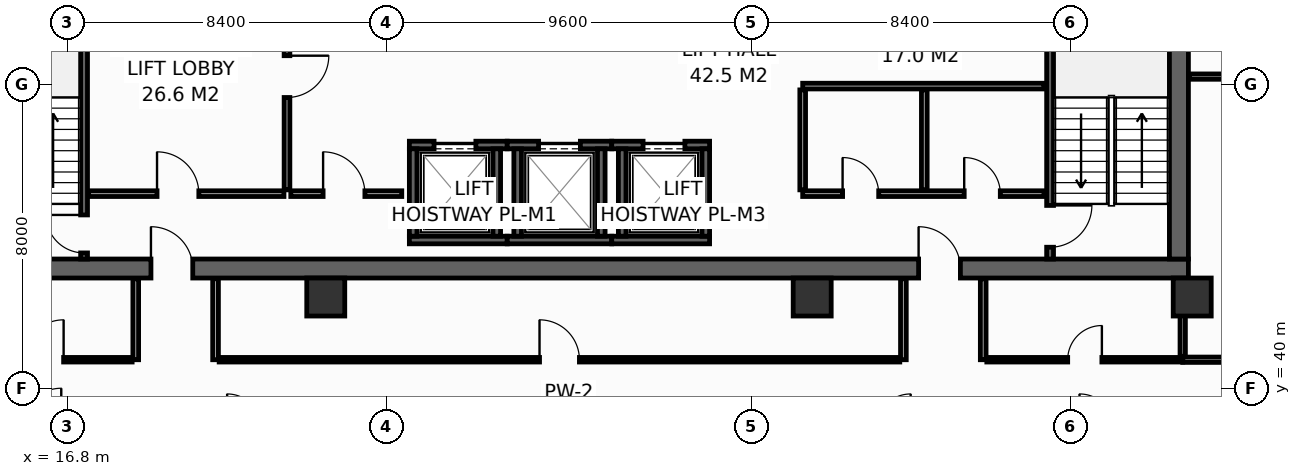
"""IFC4 building model, lengths in metres.
Left out: names, types, materials, properties, quantities, classifications, styles, units other than length and angle.
Written with IfcOpenShell. Run it as: python <this file> out.ifc"""

import sys

from ifc_helpers import new_model, si_unit, direction, frame, frame_2d, origin, origin_2d, place, context, subcontext, project, spatial, rectangle, hollow_rectangle, extrude, element, fill, save


model = new_model("IFC4")
c1 = context("Model", 3, precision=1e-05, world=origin(), true_north=direction((0.0, 1.0)))
c2 = subcontext(c1, "Body", "Model", "MODEL_VIEW")
j1 = project(units=[si_unit("LENGTHUNIT", "METRE"), si_unit("PLANEANGLEUNIT", "RADIAN")], contexts=[c1])
p1 = place(None, origin())
s1 = spatial("IfcSite", under=j1, at=p1, CompositionType="ELEMENT")
p2 = place(p1, origin())
s2 = spatial("IfcBuilding", under=s1, at=p2, CompositionType="ELEMENT")
p3 = place(p2, frame((0.0, 0.0, 133.4)))
s3 = spatial("IfcBuildingStorey", under=s2, at=p3, CompositionType="ELEMENT", Elevation=133.4)
p4 = place(p3, frame((13.6, 43.15, 0.0), z_axis=(0.0, 0.0, 1.0), x_axis=(1.0, 0.0, 0.0)))
e1 = element("IfcWall", 1, at=p4, inside=s3, PredefinedType="SHEAR", context=c2, shape_type="SweptSolid", body=[
    extrude(rectangle(XDim=32.7, YDim=0.5, at=frame_2d((16.35, 0.0))), origin(), (0.0, 0.0, 1.0), 3.55),
])
p5 = place(p4, frame((5.4, 0.0, 0.0)))
e2 = element("IfcOpeningElement", 2, at=p5, cuts=e1, PredefinedType="OPENING", context=c2, shape_type="SweptSolid", body=[
    extrude(rectangle(XDim=1.1, YDim=2.15, at=frame_2d((0.55, 1.075))), frame((0.0, 0.26, 0.0), z_axis=(0.0, -1.0, 0.0), x_axis=(1.0, 0.0, 0.0)), (0.0, 0.0, 1.0), 0.52),
])
p6 = place(p4, frame((25.6, 0.0, 0.0)))
e3 = element("IfcOpeningElement", 3, at=p6, cuts=e1, PredefinedType="OPENING", context=c2, shape_type="SweptSolid", body=[
    extrude(rectangle(XDim=1.1, YDim=2.15, at=frame_2d((0.55, 1.075))), frame((0.0, 0.26, 0.0), z_axis=(0.0, -1.0, 0.0), x_axis=(1.0, 0.0, 0.0)), (0.0, 0.0, 1.0), 0.52),
])
p7 = place(p3, frame((46.05, 43.4, 0.0), z_axis=(0.0, 0.0, 1.0), x_axis=(0.0, 1.0, 0.0)))
e4 = element("IfcWall", 4, at=p7, inside=s3, PredefinedType="SHEAR", context=c2, shape_type="SweptSolid", body=[
    extrude(rectangle(XDim=10.4, YDim=0.5, at=frame_2d((5.2, 0.0))), origin(), (0.0, 0.0, 1.0), 3.55),
])
for number, where, z_axis, x_axis in (
    (5, (23.6, 42.4, 0.0), (0.0, 0.0, 1.0), (1.0, 0.0, 0.0)),
    (6, (36.4, 42.4, 0.0), (0.0, 0.0, 1.0), (1.0, 0.0, 0.0)),
    (7, (46.4, 42.4, 0.0), (0.0, 0.0, 1.0), (1.0, 0.0, 0.0)),
):
    element("IfcColumn", number, at=place(p3, frame(where, z_axis=z_axis, x_axis=x_axis)), inside=s3, PredefinedType="COLUMN", context=c2, shape_type="SweptSolid", body=[
        extrude(hollow_rectangle(XDim=1.0, YDim=1.0, WallThickness=0.045, at=origin_2d()), origin(), (0.0, 0.0, 1.0), 3.8),
    ])
p8 = place(p3, frame((25.8, 43.9, 0.0), z_axis=(0.0, 0.0, 1.0), x_axis=(1.0, 0.0, 0.0)))
e8 = element("IfcWall", 8, at=p8, inside=s3, PredefinedType="SHEAR", context=c2, shape_type="SweptSolid", body=[
    extrude(rectangle(XDim=2.575, YDim=0.2, at=frame_2d((1.288, 0.0))), origin(), (0.0, 0.0, 1.0), 3.55),
])
p9 = place(p3, frame((25.8, 46.4, 0.0), z_axis=(0.0, 0.0, 1.0), x_axis=(1.0, 0.0, 0.0)))
e9 = element("IfcWall", 9, at=p9, inside=s3, PredefinedType="SHEAR", context=c2, shape_type="SweptSolid", body=[
    extrude(rectangle(XDim=2.575, YDim=0.2, at=frame_2d((1.288, 0.0))), origin(), (0.0, 0.0, 1.0), 3.55),
])
p10 = place(p9, frame((0.65, 0.0, 0.0)))
e10 = element("IfcOpeningElement", 10, at=p10, cuts=e9, PredefinedType="OPENING", context=c2, shape_type="SweptSolid", body=[
    extrude(rectangle(XDim=1.1, YDim=2.2, at=frame_2d((0.55, 1.1))), frame((0.0, 0.11, 0.0), z_axis=(0.0, -1.0, 0.0), x_axis=(1.0, 0.0, 0.0)), (0.0, 0.0, 1.0), 0.22),
])
for number, where, z_axis, x_axis in (
    (11, (25.9, 44.0, 0.0), (0.0, 0.0, 1.0), (0.0, 1.0, 0.0)),
    (12, (28.1, 44.0, 0.0), (0.0, 0.0, 1.0), (0.0, 1.0, 0.0)),
):
    element("IfcWall", number, at=place(p3, frame(where, z_axis=z_axis, x_axis=x_axis)), inside=s3, PredefinedType="SHEAR", context=c2, shape_type="SweptSolid", body=[
        extrude(rectangle(XDim=2.3, YDim=0.2, at=frame_2d((1.15, 0.0))), origin(), (0.0, 0.0, 1.0), 3.55),
    ])
p11 = place(p3, frame((28.375, 43.9, 0.0), z_axis=(0.0, 0.0, 1.0), x_axis=(1.0, 0.0, 0.0)))
e13 = element("IfcWall", 13, at=p11, inside=s3, PredefinedType="SHEAR", context=c2, shape_type="SweptSolid", body=[
    extrude(rectangle(XDim=2.75, YDim=0.2, at=frame_2d((1.375, 0.0))), origin(), (0.0, 0.0, 1.0), 3.55),
])
p12 = place(p3, frame((28.375, 46.4, 0.0), z_axis=(0.0, 0.0, 1.0), x_axis=(1.0, 0.0, 0.0)))
e14 = element("IfcWall", 14, at=p12, inside=s3, PredefinedType="SHEAR", context=c2, shape_type="SweptSolid", body=[
    extrude(rectangle(XDim=2.75, YDim=0.2, at=frame_2d((1.375, 0.0))), origin(), (0.0, 0.0, 1.0), 3.55),
])
p13 = place(p12, frame((0.825, 0.0, 0.0)))
e15 = element("IfcOpeningElement", 15, at=p13, cuts=e14, PredefinedType="OPENING", context=c2, shape_type="SweptSolid", body=[
    extrude(rectangle(XDim=1.1, YDim=2.2, at=frame_2d((0.55, 1.1))), frame((0.0, 0.11, 0.0), z_axis=(0.0, -1.0, 0.0), x_axis=(1.0, 0.0, 0.0)), (0.0, 0.0, 1.0), 0.22),
])
for number, where, z_axis, x_axis in (
    (16, (28.65, 44.0, 0.0), (0.0, 0.0, 1.0), (0.0, 1.0, 0.0)),
    (17, (30.85, 44.0, 0.0), (0.0, 0.0, 1.0), (0.0, 1.0, 0.0)),
):
    element("IfcWall", number, at=place(p3, frame(where, z_axis=z_axis, x_axis=x_axis)), inside=s3, PredefinedType="SHEAR", context=c2, shape_type="SweptSolid", body=[
        extrude(rectangle(XDim=2.3, YDim=0.2, at=frame_2d((1.15, 0.0))), origin(), (0.0, 0.0, 1.0), 3.55),
    ])
p14 = place(p3, frame((31.125, 43.9, 0.0), z_axis=(0.0, 0.0, 1.0), x_axis=(1.0, 0.0, 0.0)))
e18 = element("IfcWall", 18, at=p14, inside=s3, PredefinedType="SHEAR", context=c2, shape_type="SweptSolid", body=[
    extrude(rectangle(XDim=2.575, YDim=0.2, at=frame_2d((1.288, 0.0))), origin(), (0.0, 0.0, 1.0), 3.55),
])
p15 = place(p3, frame((31.125, 46.4, 0.0), z_axis=(0.0, 0.0, 1.0), x_axis=(1.0, 0.0, 0.0)))
e19 = element("IfcWall", 19, at=p15, inside=s3, PredefinedType="SHEAR", context=c2, shape_type="SweptSolid", body=[
    extrude(rectangle(XDim=2.575, YDim=0.2, at=frame_2d((1.288, 0.0))), origin(), (0.0, 0.0, 1.0), 3.55),
])
p16 = place(p15, frame((0.825, 0.0, 0.0)))
e20 = element("IfcOpeningElement", 20, at=p16, cuts=e19, PredefinedType="OPENING", context=c2, shape_type="SweptSolid", body=[
    extrude(rectangle(XDim=1.1, YDim=2.2, at=frame_2d((0.55, 1.1))), frame((0.0, 0.11, 0.0), z_axis=(0.0, -1.0, 0.0), x_axis=(1.0, 0.0, 0.0)), (0.0, 0.0, 1.0), 0.22),
])
for number, where, z_axis, x_axis in (
    (21, (31.4, 44.0, 0.0), (0.0, 0.0, 1.0), (0.0, 1.0, 0.0)),
    (22, (33.6, 44.0, 0.0), (0.0, 0.0, 1.0), (0.0, 1.0, 0.0)),
):
    element("IfcWall", number, at=place(p3, frame(where, z_axis=z_axis, x_axis=x_axis)), inside=s3, PredefinedType="SHEAR", context=c2, shape_type="SweptSolid", body=[
        extrude(rectangle(XDim=2.3, YDim=0.2, at=frame_2d((1.15, 0.0))), origin(), (0.0, 0.0, 1.0), 3.55),
    ])
p17 = place(p3, frame((17.24, 43.4, 0.0), z_axis=(0.0, 0.0, 1.0), x_axis=(0.0, 1.0, 0.0)))
e23 = element("IfcWall", 23, at=p17, inside=s3, PredefinedType="SHEAR", context=c2, shape_type="SweptSolid", body=[
    extrude(rectangle(XDim=10.4, YDim=0.18, at=frame_2d((5.2, 0.0))), origin(), (0.0, 0.0, 1.0), 3.55),
])
p18 = place(p17, frame((0.16, 0.0, 0.0)))
e24 = element("IfcOpeningElement", 24, at=p18, cuts=e23, PredefinedType="OPENING", context=c2, shape_type="SweptSolid", body=[
    extrude(rectangle(XDim=1.0, YDim=2.15, at=frame_2d((0.5, 1.075))), frame((0.0, 0.1, 0.0), z_axis=(0.0, -1.0, 0.0), x_axis=(1.0, 0.0, 0.0)), (0.0, 0.0, 1.0), 0.2),
])
p19 = place(p3, frame((42.66, 53.8, 0.0), z_axis=(0.0, 0.0, 1.0), x_axis=(0.0, -1.0, 0.0)))
e25 = element("IfcWall", 25, at=p19, inside=s3, PredefinedType="SHEAR", context=c2, shape_type="SweptSolid", body=[
    extrude(rectangle(XDim=10.4, YDim=0.18, at=frame_2d((5.2, 0.0))), origin(), (0.0, 0.0, 1.0), 3.55),
])
p20 = place(p19, frame((8.99, 0.0, 0.0)))
e26 = element("IfcOpeningElement", 26, at=p20, cuts=e25, PredefinedType="OPENING", context=c2, shape_type="SweptSolid", body=[
    extrude(rectangle(XDim=1.1, YDim=2.15, at=frame_2d((0.55, 1.075))), frame((0.0, 0.1, 0.0), z_axis=(0.0, -1.0, 0.0), x_axis=(1.0, 0.0, 0.0)), (0.0, 0.0, 1.0), 0.2),
])
p21 = place(p3, frame((17.36, 45.12, 0.0), z_axis=(0.0, 0.0, 1.0), x_axis=(1.0, 0.0, 0.0)))
e27 = element("IfcWall", 27, at=p21, inside=s3, PredefinedType="PARTITIONING", context=c2, shape_type="SweptSolid", body=[
    extrude(rectangle(XDim=5.14, YDim=0.15, at=frame_2d((2.57, 0.0))), origin(), (0.0, 0.0, 1.0), 3.55),
])
p22 = place(p21, frame((1.8, 0.0, 0.0)))
e28 = element("IfcOpeningElement", 28, at=p22, cuts=e27, PredefinedType="OPENING", context=c2, shape_type="SweptSolid", body=[
    extrude(rectangle(XDim=1.1, YDim=2.15, at=frame_2d((0.55, 1.075))), frame((0.0, 0.085, 0.0), z_axis=(0.0, -1.0, 0.0), x_axis=(1.0, 0.0, 0.0)), (0.0, 0.0, 1.0), 0.17),
])
p23 = place(p3, frame((22.58, 50.55, 0.0), z_axis=(0.0, 0.0, 1.0), x_axis=(0.0, -1.0, 0.0)))
e29 = element("IfcWall", 29, at=p23, inside=s3, PredefinedType="PARTITIONING", context=c2, shape_type="SweptSolid", body=[
    extrude(rectangle(XDim=5.33, YDim=0.15, at=frame_2d((2.665, 0.0))), origin(), (0.0, 0.0, 1.0), 3.55),
])
p24 = place(p23, frame((1.8, 0.0, 0.0)))
e30 = element("IfcOpeningElement", 30, at=p24, cuts=e29, PredefinedType="OPENING", context=c2, shape_type="SweptSolid", body=[
    extrude(rectangle(XDim=1.1, YDim=2.15, at=frame_2d((0.55, 1.075))), frame((0.0, 0.085, 0.0), z_axis=(0.0, -1.0, 0.0), x_axis=(1.0, 0.0, 0.0)), (0.0, 0.0, 1.0), 0.17),
])
p25 = place(p3, frame((22.68, 45.12, 0.0), z_axis=(0.0, 0.0, 1.0), x_axis=(1.0, 0.0, 0.0)))
e31 = element("IfcWall", 31, at=p25, inside=s3, PredefinedType="PARTITIONING", context=c2, shape_type="SweptSolid", body=[
    extrude(rectangle(XDim=2.92, YDim=0.15, at=frame_2d((1.46, 0.0))), origin(), (0.0, 0.0, 1.0), 3.55),
])
p26 = place(p25, frame((0.85, 0.0, 0.0)))
e32 = element("IfcOpeningElement", 32, at=p26, cuts=e31, PredefinedType="OPENING", context=c2, shape_type="SweptSolid", body=[
    extrude(rectangle(XDim=1.1, YDim=2.15, at=frame_2d((0.55, 1.075))), frame((0.0, 0.085, 0.0), z_axis=(0.0, -1.0, 0.0), x_axis=(1.0, 0.0, 0.0)), (0.0, 0.0, 1.0), 0.17),
])
p27 = place(p3, frame((36.15, 45.12, 0.0), z_axis=(0.0, 0.0, 1.0), x_axis=(1.0, 0.0, 0.0)))
e33 = element("IfcWall", 33, at=p27, inside=s3, PredefinedType="PARTITIONING", context=c2, shape_type="SweptSolid", body=[
    extrude(rectangle(XDim=6.35, YDim=0.15, at=frame_2d((3.175, 0.0))), origin(), (0.0, 0.0, 1.0), 3.55),
])
p28 = place(p27, frame((1.05, 0.0, 0.0)))
e34 = element("IfcOpeningElement", 34, at=p28, cuts=e33, PredefinedType="OPENING", context=c2, shape_type="SweptSolid", body=[
    extrude(rectangle(XDim=0.95, YDim=2.15, at=frame_2d((0.475, 1.075))), frame((0.0, 0.085, 0.0), z_axis=(0.0, -1.0, 0.0), x_axis=(1.0, 0.0, 0.0)), (0.0, 0.0, 1.0), 0.17),
])
p29 = place(p27, frame((4.25, 0.0, 0.0)))
e35 = element("IfcOpeningElement", 35, at=p29, cuts=e33, PredefinedType="OPENING", context=c2, shape_type="SweptSolid", body=[
    extrude(rectangle(XDim=0.95, YDim=2.15, at=frame_2d((0.475, 1.075))), frame((0.0, 0.085, 0.0), z_axis=(0.0, -1.0, 0.0), x_axis=(1.0, 0.0, 0.0)), (0.0, 0.0, 1.0), 0.17),
])
p30 = place(p3, frame((36.15, 47.95, 0.0), z_axis=(0.0, 0.0, 1.0), x_axis=(1.0, 0.0, 0.0)))
e36 = element("IfcWall", 36, at=p30, inside=s3, PredefinedType="PARTITIONING", context=c2, shape_type="SweptSolid", body=[
    extrude(rectangle(XDim=6.35, YDim=0.15, at=frame_2d((3.175, 0.0))), origin(), (0.0, 0.0, 1.0), 3.55),
])
for number, where, z_axis, x_axis in (
    (37, (36.15, 45.22, 0.0), (0.0, 0.0, 1.0), (0.0, 1.0, 0.0)),
    (38, (39.35, 45.22, 0.0), (0.0, 0.0, 1.0), (0.0, 1.0, 0.0)),
):
    element("IfcWall", number, at=place(p3, frame(where, z_axis=z_axis, x_axis=x_axis)), inside=s3, PredefinedType="PARTITIONING", context=c2, shape_type="SweptSolid", body=[
        extrude(rectangle(XDim=2.63, YDim=0.15, at=frame_2d((1.315, 0.0))), origin(), (0.0, 0.0, 1.0), 3.55),
    ])
p31 = place(p3, frame((46.15, 40.75, 0.0), z_axis=(0.0, 0.0, 1.0), x_axis=(1.0, 0.0, 0.0)))
e39 = element("IfcWall", 39, at=p31, inside=s3, PredefinedType="PARTITIONING", context=c2, shape_type="SweptSolid", body=[
    extrude(rectangle(XDim=4.05, YDim=0.14, at=frame_2d((2.025, 0.0))), origin(), (0.0, 0.0, 1.0), 3.55),
])
p32 = place(p3, frame((46.15, 40.84, 0.0), z_axis=(0.0, 0.0, 1.0), x_axis=(0.0, 1.0, 0.0)))
e40 = element("IfcWall", 40, at=p32, inside=s3, PredefinedType="PARTITIONING", context=c2, shape_type="SweptSolid", body=[
    extrude(rectangle(XDim=2.04, YDim=0.14, at=frame_2d((1.02, 0.0))), origin(), (0.0, 0.0, 1.0), 3.55),
])
p33 = place(p3, frame((46.32, 48.2, 0.0), z_axis=(0.0, 0.0, 1.0), x_axis=(1.0, 0.0, 0.0)))
e41 = element("IfcWall", 41, at=p33, inside=s3, PredefinedType="PARTITIONING", context=c2, shape_type="SweptSolid", body=[
    extrude(rectangle(XDim=3.88, YDim=0.14, at=frame_2d((1.94, 0.0))), origin(), (0.0, 0.0, 1.0), 3.55),
])
for number, where, z_axis, x_axis in (
    (42, (18.6, 40.75, 0.0), (0.0, 0.0, 1.0), (0.0, 1.0, 0.0)),
    (43, (20.7, 40.75, 0.0), (0.0, 0.0, 1.0), (0.0, 1.0, 0.0)),
    (44, (38.8, 40.75, 0.0), (0.0, 0.0, 1.0), (0.0, 1.0, 0.0)),
    (45, (40.9, 40.75, 0.0), (0.0, 0.0, 1.0), (0.0, 1.0, 0.0)),
):
    element("IfcWall", number, at=place(p3, frame(where, z_axis=z_axis, x_axis=x_axis)), inside=s3, PredefinedType="PARTITIONING", context=c2, shape_type="SweptSolid", body=[
        extrude(rectangle(XDim=2.13, YDim=0.15, at=frame_2d((1.065, 0.0))), origin(), (0.0, 0.0, 1.0), 3.55),
    ])
p34 = place(p3, frame((13.85, 40.75, 0.0), z_axis=(0.0, 0.0, 1.0), x_axis=(1.0, 0.0, 0.0)))
e46 = element("IfcWall", 46, at=p34, inside=s3, PredefinedType="PARTITIONING", context=c2, shape_type="SweptSolid", body=[
    extrude(rectangle(XDim=4.655, YDim=0.12, at=frame_2d((2.327, 0.0))), origin(), (0.0, 0.0, 1.0), 3.55),
])
p35 = place(p34, frame((1.802, 0.0, 0.0)))
e47 = element("IfcOpeningElement", 47, at=p35, cuts=e46, PredefinedType="OPENING", context=c2, shape_type="SweptSolid", body=[
    extrude(rectangle(XDim=1.05, YDim=2.15, at=frame_2d((0.525, 1.075))), frame((0.0, 0.07, 0.0), z_axis=(0.0, -1.0, 0.0), x_axis=(1.0, 0.0, 0.0)), (0.0, 0.0, 1.0), 0.14),
])
p36 = place(p3, frame((20.795, 40.75, 0.0), z_axis=(0.0, 0.0, 1.0), x_axis=(1.0, 0.0, 0.0)))
e48 = element("IfcWall", 48, at=p36, inside=s3, PredefinedType="PARTITIONING", context=c2, shape_type="SweptSolid", body=[
    extrude(rectangle(XDim=17.91, YDim=0.12, at=frame_2d((8.955, 0.0))), origin(), (0.0, 0.0, 1.0), 2.835),
])
p37 = place(p36, frame((8.43, 0.0, 0.0)))
e49 = element("IfcOpeningElement", 49, at=p37, cuts=e48, PredefinedType="OPENING", context=c2, shape_type="SweptSolid", body=[
    extrude(rectangle(XDim=1.05, YDim=2.15, at=frame_2d((0.525, 1.075))), frame((0.0, 0.07, 0.0), z_axis=(0.0, -1.0, 0.0), x_axis=(1.0, 0.0, 0.0)), (0.0, 0.0, 1.0), 0.14),
])
p38 = place(p3, frame((40.995, 40.75, 0.0), z_axis=(0.0, 0.0, 1.0), x_axis=(1.0, 0.0, 0.0)))
e50 = element("IfcWall", 50, at=p38, inside=s3, PredefinedType="PARTITIONING", context=c2, shape_type="SweptSolid", body=[
    extrude(rectangle(XDim=5.155, YDim=0.12, at=frame_2d((2.577, 0.0))), origin(), (0.0, 0.0, 1.0), 3.55),
])
p39 = place(p38, frame((2.128, 0.0, 0.0)))
e51 = element("IfcOpeningElement", 51, at=p39, cuts=e50, PredefinedType="OPENING", context=c2, shape_type="SweptSolid", body=[
    extrude(rectangle(XDim=0.9, YDim=2.1, at=frame_2d((0.45, 1.05))), frame((0.0, 0.07, 0.0), z_axis=(0.0, -1.0, 0.0), x_axis=(1.0, 0.0, 0.0)), (0.0, 0.0, 1.0), 0.14),
])
p40 = place(p10, origin())
e52 = element("IfcDoor", 52, at=p40, inside=s3, OperationType="SLIDING_TO_LEFT", PredefinedType="DOOR", context=c2, shape_type="SweptSolid", body=[
    extrude(rectangle(XDim=1.1, YDim=2.2, at=frame_2d((0.55, 1.1))), frame((0.0, 0.025, 0.0), z_axis=(0.0, -1.0, 0.0), x_axis=(1.0, 0.0, 0.0)), (0.0, 0.0, 1.0), 0.05),
])
fill(e10, e52)
p41 = place(p13, origin())
e53 = element("IfcDoor", 53, at=p41, inside=s3, OperationType="SLIDING_TO_LEFT", PredefinedType="DOOR", context=c2, shape_type="SweptSolid", body=[
    extrude(rectangle(XDim=1.1, YDim=2.2, at=frame_2d((0.55, 1.1))), frame((0.0, 0.025, 0.0), z_axis=(0.0, -1.0, 0.0), x_axis=(1.0, 0.0, 0.0)), (0.0, 0.0, 1.0), 0.05),
])
fill(e15, e53)
p42 = place(p16, origin())
e54 = element("IfcDoor", 54, at=p42, inside=s3, OperationType="SLIDING_TO_LEFT", PredefinedType="DOOR", context=c2, shape_type="SweptSolid", body=[
    extrude(rectangle(XDim=1.1, YDim=2.2, at=frame_2d((0.55, 1.1))), frame((0.0, 0.025, 0.0), z_axis=(0.0, -1.0, 0.0), x_axis=(1.0, 0.0, 0.0)), (0.0, 0.0, 1.0), 0.05),
])
fill(e20, e54)
p43 = place(p18, origin())
e55 = element("IfcDoor", 55, at=p43, inside=s3, OperationType="SINGLE_SWING_RIGHT", PredefinedType="DOOR", context=c2, shape_type="SweptSolid", body=[
    extrude(rectangle(XDim=1.0, YDim=2.15, at=frame_2d((0.5, 1.075))), frame((0.0, 0.025, 0.0), z_axis=(0.0, -1.0, 0.0), x_axis=(1.0, 0.0, 0.0)), (0.0, 0.0, 1.0), 0.05),
])
fill(e24, e55)
p44 = place(p20, origin())
e56 = element("IfcDoor", 56, at=p44, inside=s3, OperationType="SINGLE_SWING_LEFT", PredefinedType="DOOR", context=c2, shape_type="SweptSolid", body=[
    extrude(rectangle(XDim=1.1, YDim=2.15, at=frame_2d((0.55, 1.075))), frame((0.0, 0.025, 0.0), z_axis=(0.0, -1.0, 0.0), x_axis=(1.0, 0.0, 0.0)), (0.0, 0.0, 1.0), 0.05),
])
fill(e26, e56)
p45 = place(p22, origin())
e57 = element("IfcDoor", 57, at=p45, inside=s3, OperationType="SINGLE_SWING_LEFT", PredefinedType="DOOR", context=c2, shape_type="SweptSolid", body=[
    extrude(rectangle(XDim=1.1, YDim=2.15, at=frame_2d((0.55, 1.075))), frame((0.0, 0.025, 0.0), z_axis=(0.0, -1.0, 0.0), x_axis=(1.0, 0.0, 0.0)), (0.0, 0.0, 1.0), 0.05),
])
fill(e28, e57)
p46 = place(p24, origin())
e58 = element("IfcDoor", 58, at=p46, inside=s3, OperationType="SINGLE_SWING_LEFT", PredefinedType="DOOR", context=c2, shape_type="SweptSolid", body=[
    extrude(rectangle(XDim=1.1, YDim=2.15, at=frame_2d((0.55, 1.075))), frame((0.0, 0.025, 0.0), z_axis=(0.0, -1.0, 0.0), x_axis=(1.0, 0.0, 0.0)), (0.0, 0.0, 1.0), 0.05),
])
fill(e30, e58)
p47 = place(p26, origin())
e59 = element("IfcDoor", 59, at=p47, inside=s3, OperationType="SINGLE_SWING_LEFT", PredefinedType="DOOR", context=c2, shape_type="SweptSolid", body=[
    extrude(rectangle(XDim=1.1, YDim=2.15, at=frame_2d((0.55, 1.075))), frame((0.0, 0.025, 0.0), z_axis=(0.0, -1.0, 0.0), x_axis=(1.0, 0.0, 0.0)), (0.0, 0.0, 1.0), 0.05),
])
fill(e32, e59)
p48 = place(p5, origin())
e60 = element("IfcDoor", 60, at=p48, inside=s3, OperationType="SINGLE_SWING_LEFT", PredefinedType="DOOR", context=c2, shape_type="SweptSolid", body=[
    extrude(rectangle(XDim=1.1, YDim=2.15, at=frame_2d((0.55, 1.075))), frame((0.0, 0.025, 0.0), z_axis=(0.0, -1.0, 0.0), x_axis=(1.0, 0.0, 0.0)), (0.0, 0.0, 1.0), 0.05),
])
fill(e2, e60)
p49 = place(p6, origin())
e61 = element("IfcDoor", 61, at=p49, inside=s3, OperationType="SINGLE_SWING_LEFT", PredefinedType="DOOR", context=c2, shape_type="SweptSolid", body=[
    extrude(rectangle(XDim=1.1, YDim=2.15, at=frame_2d((0.55, 1.075))), frame((0.0, 0.025, 0.0), z_axis=(0.0, -1.0, 0.0), x_axis=(1.0, 0.0, 0.0)), (0.0, 0.0, 1.0), 0.05),
])
fill(e3, e61)
p50 = place(p28, origin())
e62 = element("IfcDoor", 62, at=p50, inside=s3, OperationType="SINGLE_SWING_LEFT", PredefinedType="DOOR", context=c2, shape_type="SweptSolid", body=[
    extrude(rectangle(XDim=0.95, YDim=2.15, at=frame_2d((0.475, 1.075))), frame((0.0, 0.025, 0.0), z_axis=(0.0, -1.0, 0.0), x_axis=(1.0, 0.0, 0.0)), (0.0, 0.0, 1.0), 0.05),
])
fill(e34, e62)
p51 = place(p29, origin())
e63 = element("IfcDoor", 63, at=p51, inside=s3, OperationType="SINGLE_SWING_LEFT", PredefinedType="DOOR", context=c2, shape_type="SweptSolid", body=[
    extrude(rectangle(XDim=0.95, YDim=2.15, at=frame_2d((0.475, 1.075))), frame((0.0, 0.025, 0.0), z_axis=(0.0, -1.0, 0.0), x_axis=(1.0, 0.0, 0.0)), (0.0, 0.0, 1.0), 0.05),
])
fill(e35, e63)
p52 = place(p35, origin())
e64 = element("IfcDoor", 64, at=p52, inside=s3, OperationType="SINGLE_SWING_RIGHT", PredefinedType="DOOR", context=c2, shape_type="SweptSolid", body=[
    extrude(rectangle(XDim=1.05, YDim=2.15, at=frame_2d((0.525, 1.075))), frame((0.0, 0.025, 0.0), z_axis=(0.0, -1.0, 0.0), x_axis=(1.0, 0.0, 0.0)), (0.0, 0.0, 1.0), 0.05),
])
fill(e47, e64)
p53 = place(p37, origin())
e65 = element("IfcDoor", 65, at=p53, inside=s3, OperationType="SINGLE_SWING_LEFT", PredefinedType="DOOR", context=c2, shape_type="SweptSolid", body=[
    extrude(rectangle(XDim=1.05, YDim=2.15, at=frame_2d((0.525, 1.075))), frame((0.0, 0.025, 0.0), z_axis=(0.0, -1.0, 0.0), x_axis=(1.0, 0.0, 0.0)), (0.0, 0.0, 1.0), 0.05),
])
fill(e49, e65)
p54 = place(p39, origin())
e66 = element("IfcDoor", 66, at=p54, inside=s3, OperationType="SINGLE_SWING_RIGHT", PredefinedType="DOOR", context=c2, shape_type="SweptSolid", body=[
    extrude(rectangle(XDim=0.9, YDim=2.1, at=frame_2d((0.45, 1.05))), frame((0.0, 0.025, 0.0), z_axis=(0.0, -1.0, 0.0), x_axis=(1.0, 0.0, 0.0)), (0.0, 0.0, 1.0), 0.05),
])
fill(e51, e66)
save(model, sys.argv[1])
